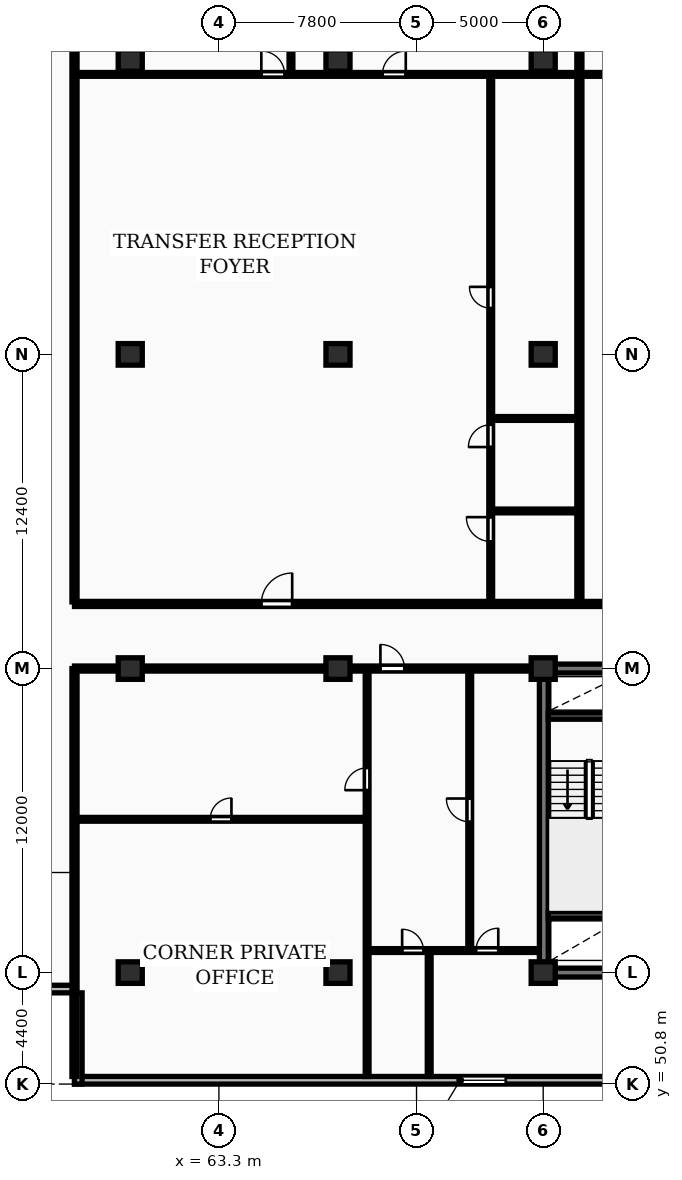
"""IFC4 building model, lengths in metres.
Left out: names, types, materials, properties, quantities, classifications, styles, units other than length and angle.
Written with IfcOpenShell. Run it as: python <this file> out.ifc"""

import sys

from ifc_helpers import new_model, si_unit, direction, frame, frame_2d, origin, origin_2d, place, context, subcontext, project, spatial, rectangle, extrude, element, fill, save


model = new_model("IFC4")
c1 = context("Model", 3, precision=1e-05, world=origin(), true_north=direction((0.0, 1.0)))
c2 = subcontext(c1, "Body", "Model", "MODEL_VIEW")
j1 = project(units=[si_unit("LENGTHUNIT", "METRE"), si_unit("PLANEANGLEUNIT", "RADIAN")], contexts=[c1])
p1 = place(None, origin())
s1 = spatial("IfcSite", under=j1, at=p1, CompositionType="ELEMENT")
p2 = place(p1, origin())
s2 = spatial("IfcBuilding", under=s1, at=p2, CompositionType="ELEMENT")
p3 = place(p2, frame((0.0, 0.0, 93.8)))
s3 = spatial("IfcBuildingStorey", under=s2, at=p3, CompositionType="ELEMENT", Elevation=93.8)
for number, where, z_axis, x_axis in (
    (1, (59.8, 55.2, 0.0), (0.0, 0.0, 1.0), (1.0, 0.0, 0.0)),
    (2, (59.8, 67.2, 0.0), (0.0, 0.0, 1.0), (1.0, 0.0, 0.0)),
    (3, (59.8, 79.6, 0.0), (0.0, 0.0, 1.0), (1.0, 0.0, 0.0)),
    (4, (59.8, 91.2, 0.0), (0.0, 0.0, 1.0), (1.0, 0.0, 0.0)),
    (5, (68.0, 55.2, 0.0), (0.0, 0.0, 1.0), (1.0, 0.0, 0.0)),
    (6, (68.0, 67.2, 0.0), (0.0, 0.0, 1.0), (1.0, 0.0, 0.0)),
    (7, (68.0, 79.6, 0.0), (0.0, 0.0, 1.0), (1.0, 0.0, 0.0)),
    (8, (68.0, 91.2, 0.0), (0.0, 0.0, 1.0), (1.0, 0.0, 0.0)),
    (9, (76.1, 55.2, 0.0), (0.0, 0.0, 1.0), (1.0, 0.0, 0.0)),
    (10, (76.1, 67.2, 0.0), (0.0, 0.0, 1.0), (1.0, 0.0, 0.0)),
    (11, (76.1, 79.6, 0.0), (0.0, 0.0, 1.0), (1.0, 0.0, 0.0)),
    (12, (76.1, 91.2, 0.0), (0.0, 0.0, 1.0), (1.0, 0.0, 0.0)),
):
    element("IfcColumn", number, at=place(p3, frame(where, z_axis=z_axis, x_axis=x_axis)), inside=s3, PredefinedType="COLUMN", context=c2, shape_type="SweptSolid", body=[
        extrude(rectangle(XDim=0.95, YDim=0.85, at=origin_2d()), origin(), (0.0, 0.0, 1.0), 3.25),
    ])
p4 = place(p3, frame((57.6, 50.95, 0.0), z_axis=(0.0, 0.0, 1.0), x_axis=(1.0, 0.0, 0.0)))
e13 = element("IfcWall", 13, at=p4, inside=s3, PredefinedType="STANDARD", context=c2, shape_type="SweptSolid", body=[
    extrude(rectangle(XDim=73.0, YDim=0.3, at=frame_2d((36.5, 0.0))), origin(), (0.0, 0.0, 1.0), 2.97),
])
p5 = place(p4, frame((15.225, 0.0, 0.85)))
e14 = element("IfcOpeningElement", 14, at=p5, cuts=e13, PredefinedType="OPENING", context=c2, shape_type="SweptSolid", body=[
    extrude(rectangle(XDim=1.8, YDim=1.8, at=frame_2d((0.9, 0.9))), frame((0.0, 0.16, 0.0), z_axis=(0.0, -1.0, 0.0), x_axis=(1.0, 0.0, 0.0)), (0.0, 0.0, 1.0), 0.32),
])
p6 = place(p4, frame((58.575, 0.0, 0.85)))
e15 = element("IfcOpeningElement", 15, at=p6, cuts=e13, PredefinedType="OPENING", context=c2, shape_type="SweptSolid", body=[
    extrude(rectangle(XDim=1.8, YDim=1.8, at=frame_2d((0.9, 0.9))), frame((0.0, 0.16, 0.0), z_axis=(0.0, -1.0, 0.0), x_axis=(1.0, 0.0, 0.0)), (0.0, 0.0, 1.0), 0.32),
])
p7 = place(p3, frame((54.0, 54.55, 0.0), z_axis=(0.0, 0.0, 1.0), x_axis=(1.0, 0.0, 0.0)))
e16 = element("IfcWall", 16, at=p7, inside=s3, PredefinedType="STANDARD", context=c2, shape_type="SweptSolid", body=[
    extrude(rectangle(XDim=3.6, YDim=0.3, at=frame_2d((1.8, 0.0))), origin(), (0.0, 0.0, 1.0), 2.97),
])
p8 = place(p3, frame((57.75, 54.4, 0.0), z_axis=(0.0, 0.0, 1.0), x_axis=(0.0, -1.0, 0.0)))
e17 = element("IfcWall", 17, at=p8, inside=s3, PredefinedType="STANDARD", context=c2, shape_type="SweptSolid", body=[
    extrude(rectangle(XDim=3.6, YDim=0.3, at=frame_2d((1.8, 0.0))), origin(), (0.0, 0.0, 1.0), 2.97),
])
p9 = place(p3, frame((75.95, 55.2, 0.0), z_axis=(0.0, 0.0, 1.0), x_axis=(1.0, 0.0, 0.0)))
e18 = element("IfcWall", 18, at=p9, inside=s3, PredefinedType="SHEAR", context=c2, shape_type="SweptSolid", body=[
    extrude(rectangle(XDim=36.3, YDim=0.35, at=frame_2d((18.15, 0.0))), origin(), (0.0, 0.0, 1.0), 3.25),
])
p10 = place(p3, frame((76.125, 55.375, 0.0), z_axis=(0.0, 0.0, 1.0), x_axis=(0.0, 1.0, 0.0)))
e19 = element("IfcWall", 19, at=p10, inside=s3, PredefinedType="SHEAR", context=c2, shape_type="SweptSolid", body=[
    extrude(rectangle(XDim=11.65, YDim=0.35, at=frame_2d((5.825, 0.0))), origin(), (0.0, 0.0, 1.0), 3.25),
])
p11 = place(p3, frame((75.95, 67.2, 0.0), z_axis=(0.0, 0.0, 1.0), x_axis=(1.0, 0.0, 0.0)))
e20 = element("IfcWall", 20, at=p11, inside=s3, PredefinedType="SHEAR", context=c2, shape_type="SweptSolid", body=[
    extrude(rectangle(XDim=36.3, YDim=0.35, at=frame_2d((18.15, 0.0))), origin(), (0.0, 0.0, 1.0), 3.25),
])
p12 = place(p11, frame((5.25, 0.0, 0.0)))
e21 = element("IfcOpeningElement", 21, at=p12, cuts=e20, PredefinedType="OPENING", context=c2, shape_type="SweptSolid", body=[
    extrude(rectangle(XDim=1.0, YDim=2.15, at=frame_2d((0.5, 1.075))), frame((0.0, 0.185, 0.0), z_axis=(0.0, -1.0, 0.0), x_axis=(1.0, 0.0, 0.0)), (0.0, 0.0, 1.0), 0.37),
])
p13 = place(p11, frame((21.6, 0.0, 0.0)))
e22 = element("IfcOpeningElement", 22, at=p13, cuts=e20, PredefinedType="OPENING", context=c2, shape_type="SweptSolid", body=[
    extrude(rectangle(XDim=1.5, YDim=2.2, at=frame_2d((0.75, 1.1))), frame((0.0, 0.185, 0.0), z_axis=(0.0, -1.0, 0.0), x_axis=(1.0, 0.0, 0.0)), (0.0, 0.0, 1.0), 0.37),
])
p14 = place(p11, frame((30.45, 0.0, 0.0)))
e23 = element("IfcOpeningElement", 23, at=p14, cuts=e20, PredefinedType="OPENING", context=c2, shape_type="SweptSolid", body=[
    extrude(rectangle(XDim=1.0, YDim=2.15, at=frame_2d((0.5, 1.075))), frame((0.0, 0.185, 0.0), z_axis=(0.0, -1.0, 0.0), x_axis=(1.0, 0.0, 0.0)), (0.0, 0.0, 1.0), 0.37),
])
for number, where, z_axis, x_axis in (
    (24, (76.3, 57.475, 0.0), (0.0, 0.0, 1.0), (1.0, 0.0, 0.0)),
    (25, (76.3, 65.325, 0.0), (0.0, 0.0, 1.0), (1.0, 0.0, 0.0)),
):
    element("IfcWall", number, at=place(p3, frame(where, z_axis=z_axis, x_axis=x_axis)), inside=s3, PredefinedType="SHEAR", context=c2, shape_type="SweptSolid", body=[
        extrude(rectangle(XDim=3.24, YDim=0.25, at=frame_2d((1.62, 0.0))), origin(), (0.0, 0.0, 1.0), 3.25),
    ])
p15 = place(p3, frame((57.6, 51.1, 0.0), z_axis=(0.0, 0.0, 1.0), x_axis=(0.0, 1.0, 0.0)))
e26 = element("IfcWall", 26, at=p15, inside=s3, PredefinedType="PARTITIONING", context=c2, shape_type="SweptSolid", body=[
    extrude(rectangle(XDim=16.1, YDim=0.2, at=frame_2d((8.05, 0.0))), origin(), (0.0, 0.0, 1.0), 2.97),
])
p16 = place(p3, frame((57.6, 61.25, 0.0), z_axis=(0.0, 0.0, 1.0), x_axis=(1.0, 0.0, 0.0)))
e27 = element("IfcWall", 27, at=p16, inside=s3, PredefinedType="PARTITIONING", context=c2, shape_type="SweptSolid", body=[
    extrude(rectangle(XDim=11.55, YDim=0.15, at=frame_2d((5.775, 0.0))), origin(), (0.0, 0.0, 1.0), 2.97),
])
p17 = place(p16, frame((5.355, 0.0, 0.0)))
e28 = element("IfcOpeningElement", 28, at=p17, cuts=e27, PredefinedType="OPENING", context=c2, shape_type="SweptSolid", body=[
    extrude(rectangle(XDim=0.84, YDim=2.04, at=frame_2d((0.42, 1.02))), frame((0.0, 0.085, 0.0), z_axis=(0.0, -1.0, 0.0), x_axis=(1.0, 0.0, 0.0)), (0.0, 0.0, 1.0), 0.17),
])
p18 = place(p3, frame((69.15, 51.1, 0.0), z_axis=(0.0, 0.0, 1.0), x_axis=(0.0, 1.0, 0.0)))
e29 = element("IfcWall", 29, at=p18, inside=s3, PredefinedType="PARTITIONING", context=c2, shape_type="SweptSolid", body=[
    extrude(rectangle(XDim=16.05, YDim=0.15, at=frame_2d((8.025, 0.0))), origin(), (0.0, 0.0, 1.0), 2.97),
])
p19 = place(p18, frame((11.3, 0.0, 0.0)))
e30 = element("IfcOpeningElement", 30, at=p19, cuts=e29, PredefinedType="OPENING", context=c2, shape_type="SweptSolid", body=[
    extrude(rectangle(XDim=0.88, YDim=2.06, at=frame_2d((0.44, 1.03))), frame((0.0, 0.085, 0.0), z_axis=(0.0, -1.0, 0.0), x_axis=(1.0, 0.0, 0.0)), (0.0, 0.0, 1.0), 0.17),
])
p20 = place(p3, frame((73.2, 56.07, 0.0), z_axis=(0.0, 0.0, 1.0), x_axis=(0.0, 1.0, 0.0)))
e31 = element("IfcWall", 31, at=p20, inside=s3, PredefinedType="PARTITIONING", context=c2, shape_type="SweptSolid", body=[
    extrude(rectangle(XDim=11.08, YDim=0.15, at=frame_2d((5.54, 0.0))), origin(), (0.0, 0.0, 1.0), 2.97),
])
p21 = place(p20, frame((5.08, 0.0, 0.0)))
e32 = element("IfcOpeningElement", 32, at=p21, cuts=e31, PredefinedType="OPENING", context=c2, shape_type="SweptSolid", body=[
    extrude(rectangle(XDim=0.92, YDim=2.08, at=frame_2d((0.46, 1.04))), frame((0.0, 0.085, 0.0), z_axis=(0.0, -1.0, 0.0), x_axis=(1.0, 0.0, 0.0)), (0.0, 0.0, 1.0), 0.17),
])
p22 = place(p3, frame((71.6, 51.1, 0.0), z_axis=(0.0, 0.0, 1.0), x_axis=(0.0, 1.0, 0.0)))
e33 = element("IfcWall", 33, at=p22, inside=s3, PredefinedType="PARTITIONING", context=c2, shape_type="SweptSolid", body=[
    extrude(rectangle(XDim=4.97, YDim=0.15, at=frame_2d((2.485, 0.0))), origin(), (0.0, 0.0, 1.0), 2.97),
])
p23 = place(p3, frame((69.17, 56.07, 0.0), z_axis=(0.0, 0.0, 1.0), x_axis=(1.0, 0.0, 0.0)))
e34 = element("IfcWall", 34, at=p23, inside=s3, PredefinedType="PARTITIONING", context=c2, shape_type="SweptSolid", body=[
    extrude(rectangle(XDim=6.76, YDim=0.15, at=frame_2d((3.38, 0.0))), origin(), (0.0, 0.0, 1.0), 2.97),
])
p24 = place(p23, frame((1.362, 0.0, 0.0)))
e35 = element("IfcOpeningElement", 35, at=p24, cuts=e34, PredefinedType="OPENING", context=c2, shape_type="SweptSolid", body=[
    extrude(rectangle(XDim=0.84, YDim=2.04, at=frame_2d((0.42, 1.02))), frame((0.0, 0.085, 0.0), z_axis=(0.0, -1.0, 0.0), x_axis=(1.0, 0.0, 0.0)), (0.0, 0.0, 1.0), 0.17),
])
p25 = place(p23, frame((4.277, 0.0, 0.0)))
e36 = element("IfcOpeningElement", 36, at=p25, cuts=e34, PredefinedType="OPENING", context=c2, shape_type="SweptSolid", body=[
    extrude(rectangle(XDim=0.88, YDim=2.06, at=frame_2d((0.44, 1.03))), frame((0.0, 0.085, 0.0), z_axis=(0.0, -1.0, 0.0), x_axis=(1.0, 0.0, 0.0)), (0.0, 0.0, 1.0), 0.17),
])
p26 = place(p3, frame((57.6, 67.2, 0.0), z_axis=(0.0, 0.0, 1.0), x_axis=(1.0, 0.0, 0.0)))
e37 = element("IfcWall", 37, at=p26, inside=s3, PredefinedType="PARTITIONING", context=c2, shape_type="SweptSolid", body=[
    extrude(rectangle(XDim=18.35, YDim=0.2, at=frame_2d((9.175, 0.0))), origin(), (0.0, 0.0, 1.0), 2.433),
])
p27 = place(p26, frame((12.075, 0.0, 0.0)))
e38 = element("IfcOpeningElement", 38, at=p27, cuts=e37, PredefinedType="OPENING", context=c2, shape_type="SweptSolid", body=[
    extrude(rectangle(XDim=0.95, YDim=2.15, at=frame_2d((0.475, 1.075))), frame((0.0, 0.11, 0.0), z_axis=(0.0, -1.0, 0.0), x_axis=(1.0, 0.0, 0.0)), (0.0, 0.0, 1.0), 0.22),
])
for number, where, z_axis, x_axis in (
    (39, (57.6, 69.83, 0.0), (0.0, 0.0, 1.0), (0.0, 1.0, 0.0)),
    (40, (77.528, 69.83, 0.0), (0.0, 0.0, 1.0), (0.0, 1.0, 0.0)),
):
    element("IfcWall", number, at=place(p3, frame(where, z_axis=z_axis, x_axis=x_axis)), inside=s3, PredefinedType="PARTITIONING", context=c2, shape_type="SweptSolid", body=[
        extrude(rectangle(XDim=26.07, YDim=0.2, at=frame_2d((13.035, 0.0))), origin(), (0.0, 0.0, 1.0), 2.97),
    ])
p28 = place(p3, frame((74.088, 73.42, 0.0), z_axis=(0.0, 0.0, 1.0), x_axis=(1.0, 0.0, 0.0)))
e41 = element("IfcWall", 41, at=p28, inside=s3, PredefinedType="PARTITIONING", context=c2, shape_type="SweptSolid", body=[
    extrude(rectangle(XDim=3.36, YDim=0.15, at=frame_2d((1.68, 0.0))), origin(), (0.0, 0.0, 1.0), 2.561),
])
p29 = place(p3, frame((74.088, 77.07, 0.0), z_axis=(0.0, 0.0, 1.0), x_axis=(1.0, 0.0, 0.0)))
e42 = element("IfcWall", 42, at=p29, inside=s3, PredefinedType="PARTITIONING", context=c2, shape_type="SweptSolid", body=[
    extrude(rectangle(XDim=3.36, YDim=0.15, at=frame_2d((1.68, 0.0))), origin(), (0.0, 0.0, 1.0), 2.97),
])
p30 = place(p3, frame((74.028, 69.81, 0.0), z_axis=(0.0, 0.0, 1.0), x_axis=(0.0, 1.0, 0.0)))
e43 = element("IfcWall", 43, at=p30, inside=s3, PredefinedType="PARTITIONING", context=c2, shape_type="SweptSolid", body=[
    extrude(rectangle(XDim=20.78, YDim=0.15, at=frame_2d((10.39, 0.0))), origin(), (0.0, 0.0, 1.0), 2.97),
])
p31 = place(p30, frame((2.406, 0.0, 0.0)))
e44 = element("IfcOpeningElement", 44, at=p31, cuts=e43, PredefinedType="OPENING", context=c2, shape_type="SweptSolid", body=[
    extrude(rectangle(XDim=0.96, YDim=2.1, at=frame_2d((0.48, 1.05))), frame((0.0, 0.085, 0.0), z_axis=(0.0, -1.0, 0.0), x_axis=(1.0, 0.0, 0.0)), (0.0, 0.0, 1.0), 0.17),
])
p32 = place(p30, frame((6.133, 0.0, 0.0)))
e45 = element("IfcOpeningElement", 45, at=p32, cuts=e43, PredefinedType="OPENING", context=c2, shape_type="SweptSolid", body=[
    extrude(rectangle(XDim=0.88, YDim=2.06, at=frame_2d((0.44, 1.03))), frame((0.0, 0.085, 0.0), z_axis=(0.0, -1.0, 0.0), x_axis=(1.0, 0.0, 0.0)), (0.0, 0.0, 1.0), 0.17),
])
p33 = place(p30, frame((11.615, 0.0, 0.0)))
e46 = element("IfcOpeningElement", 46, at=p33, cuts=e43, PredefinedType="OPENING", context=c2, shape_type="SweptSolid", body=[
    extrude(rectangle(XDim=0.84, YDim=2.04, at=frame_2d((0.42, 1.02))), frame((0.0, 0.085, 0.0), z_axis=(0.0, -1.0, 0.0), x_axis=(1.0, 0.0, 0.0)), (0.0, 0.0, 1.0), 0.17),
])
p34 = place(p3, frame((66.144, 90.73, 0.0), z_axis=(0.0, 0.0, 1.0), x_axis=(0.0, 1.0, 0.0)))
e47 = element("IfcWall", 47, at=p34, inside=s3, PredefinedType="PARTITIONING", context=c2, shape_type="SweptSolid", body=[
    extrude(rectangle(XDim=5.17, YDim=0.15, at=frame_2d((2.585, 0.0))), origin(), (0.0, 0.0, 1.0), 2.97),
])
p35 = place(p3, frame((57.68, 90.65, 0.0), z_axis=(0.0, 0.0, 1.0), x_axis=(1.0, 0.0, 0.0)))
e48 = element("IfcWall", 48, at=p35, inside=s3, PredefinedType="PARTITIONING", context=c2, shape_type="SweptSolid", body=[
    extrude(rectangle(XDim=19.769, YDim=0.15, at=frame_2d((9.884, 0.0))), origin(), (0.0, 0.0, 1.0), 2.97),
])
p36 = place(p35, frame((7.294, 0.0, 0.0)))
e49 = element("IfcOpeningElement", 49, at=p36, cuts=e48, PredefinedType="OPENING", context=c2, shape_type="SweptSolid", body=[
    extrude(rectangle(XDim=0.92, YDim=2.08, at=frame_2d((0.46, 1.04))), frame((0.0, 0.085, 0.0), z_axis=(0.0, -1.0, 0.0), x_axis=(1.0, 0.0, 0.0)), (0.0, 0.0, 1.0), 0.17),
])
p37 = place(p35, frame((12.076, 0.0, 0.0)))
e50 = element("IfcOpeningElement", 50, at=p37, cuts=e48, PredefinedType="OPENING", context=c2, shape_type="SweptSolid", body=[
    extrude(rectangle(XDim=0.92, YDim=2.08, at=frame_2d((0.46, 1.04))), frame((0.0, 0.085, 0.0), z_axis=(0.0, -1.0, 0.0), x_axis=(1.0, 0.0, 0.0)), (0.0, 0.0, 1.0), 0.17),
])
p38 = place(p3, frame((77.608, 90.65, 0.0), z_axis=(0.0, 0.0, 1.0), x_axis=(1.0, 0.0, 0.0)))
e51 = element("IfcWall", 51, at=p38, inside=s3, PredefinedType="PARTITIONING", context=c2, shape_type="SweptSolid", body=[
    extrude(rectangle(XDim=21.87, YDim=0.15, at=frame_2d((10.935, 0.0))), origin(), (0.0, 0.0, 1.0), 2.97),
])
p39 = place(p38, frame((4.191, 0.0, 0.0)))
e52 = element("IfcOpeningElement", 52, at=p39, cuts=e51, PredefinedType="OPENING", context=c2, shape_type="SweptSolid", body=[
    extrude(rectangle(XDim=0.92, YDim=2.08, at=frame_2d((0.46, 1.04))), frame((0.0, 0.085, 0.0), z_axis=(0.0, -1.0, 0.0), x_axis=(1.0, 0.0, 0.0)), (0.0, 0.0, 1.0), 0.17),
])
p40 = place(p38, frame((10.475, 0.0, 0.0)))
e53 = element("IfcOpeningElement", 53, at=p40, cuts=e51, PredefinedType="OPENING", context=c2, shape_type="SweptSolid", body=[
    extrude(rectangle(XDim=0.92, YDim=2.08, at=frame_2d((0.46, 1.04))), frame((0.0, 0.085, 0.0), z_axis=(0.0, -1.0, 0.0), x_axis=(1.0, 0.0, 0.0)), (0.0, 0.0, 1.0), 0.17),
])
p41 = place(p3, frame((57.6, 69.75, 0.0), z_axis=(0.0, 0.0, 1.0), x_axis=(1.0, 0.0, 0.0)))
e54 = element("IfcWall", 54, at=p41, inside=s3, PredefinedType="PARTITIONING", context=c2, shape_type="SweptSolid", body=[
    extrude(rectangle(XDim=73.0, YDim=0.2, at=frame_2d((36.5, 0.0))), origin(), (0.0, 0.0, 1.0), 2.97),
])
p42 = place(p41, frame((7.372, 0.0, 0.0)))
e55 = element("IfcOpeningElement", 55, at=p42, cuts=e54, PredefinedType="OPENING", context=c2, shape_type="SweptSolid", body=[
    extrude(rectangle(XDim=1.22, YDim=2.18, at=frame_2d((0.61, 1.09))), frame((0.0, 0.11, 0.0), z_axis=(0.0, -1.0, 0.0), x_axis=(1.0, 0.0, 0.0)), (0.0, 0.0, 1.0), 0.22),
])
p43 = place(p41, frame((29.368, 0.0, 0.0)))
e56 = element("IfcOpeningElement", 56, at=p43, cuts=e54, PredefinedType="OPENING", context=c2, shape_type="SweptSolid", body=[
    extrude(rectangle(XDim=1.22, YDim=2.18, at=frame_2d((0.61, 1.09))), frame((0.0, 0.11, 0.0), z_axis=(0.0, -1.0, 0.0), x_axis=(1.0, 0.0, 0.0)), (0.0, 0.0, 1.0), 0.22),
])
p44 = place(p41, frame((48.88, 0.0, 0.0)))
e57 = element("IfcOpeningElement", 57, at=p44, cuts=e54, PredefinedType="OPENING", context=c2, shape_type="SweptSolid", body=[
    extrude(rectangle(XDim=1.22, YDim=2.18, at=frame_2d((0.61, 1.09))), frame((0.0, 0.11, 0.0), z_axis=(0.0, -1.0, 0.0), x_axis=(1.0, 0.0, 0.0)), (0.0, 0.0, 1.0), 0.22),
])
p45 = place(p41, frame((60.081, 0.0, 0.0)))
e58 = element("IfcOpeningElement", 58, at=p45, cuts=e54, PredefinedType="OPENING", context=c2, shape_type="SweptSolid", body=[
    extrude(rectangle(XDim=0.95, YDim=2.15, at=frame_2d((0.475, 1.075))), frame((0.0, 0.11, 0.0), z_axis=(0.0, -1.0, 0.0), x_axis=(1.0, 0.0, 0.0)), (0.0, 0.0, 1.0), 0.22),
])
p46 = place(p5, origin())
e59 = element("IfcWindow", 59, at=p46, inside=s3, PartitioningType="SINGLE_PANEL", PredefinedType="WINDOW", context=c2, shape_type="SweptSolid", body=[
    extrude(rectangle(XDim=1.8, YDim=1.8, at=frame_2d((0.9, 0.9))), frame((0.0, 0.03, 0.0), z_axis=(0.0, -1.0, 0.0), x_axis=(1.0, 0.0, 0.0)), (0.0, 0.0, 1.0), 0.06),
])
fill(e14, e59)
p47 = place(p17, origin())
e60 = element("IfcDoor", 60, at=p47, inside=s3, OperationType="SINGLE_SWING_RIGHT", PredefinedType="DOOR", context=c2, shape_type="SweptSolid", body=[
    extrude(rectangle(XDim=0.84, YDim=2.04, at=frame_2d((0.42, 1.02))), frame((0.0, 0.025, 0.0), z_axis=(0.0, -1.0, 0.0), x_axis=(1.0, 0.0, 0.0)), (0.0, 0.0, 1.0), 0.05),
])
fill(e28, e60)
p48 = place(p19, origin())
e61 = element("IfcDoor", 61, at=p48, inside=s3, OperationType="SINGLE_SWING_LEFT", PredefinedType="DOOR", context=c2, shape_type="SweptSolid", body=[
    extrude(rectangle(XDim=0.88, YDim=2.06, at=frame_2d((0.44, 1.03))), frame((0.0, 0.025, 0.0), z_axis=(0.0, -1.0, 0.0), x_axis=(1.0, 0.0, 0.0)), (0.0, 0.0, 1.0), 0.05),
])
fill(e30, e61)
p49 = place(p21, origin())
e62 = element("IfcDoor", 62, at=p49, inside=s3, OperationType="SINGLE_SWING_RIGHT", PredefinedType="DOOR", context=c2, shape_type="SweptSolid", body=[
    extrude(rectangle(XDim=0.92, YDim=2.08, at=frame_2d((0.46, 1.04))), frame((0.0, 0.025, 0.0), z_axis=(0.0, -1.0, 0.0), x_axis=(1.0, 0.0, 0.0)), (0.0, 0.0, 1.0), 0.05),
])
fill(e32, e62)
p50 = place(p24, origin())
e63 = element("IfcDoor", 63, at=p50, inside=s3, OperationType="SINGLE_SWING_LEFT", PredefinedType="DOOR", context=c2, shape_type="SweptSolid", body=[
    extrude(rectangle(XDim=0.84, YDim=2.04, at=frame_2d((0.42, 1.02))), frame((0.0, 0.025, 0.0), z_axis=(0.0, -1.0, 0.0), x_axis=(1.0, 0.0, 0.0)), (0.0, 0.0, 1.0), 0.05),
])
fill(e35, e63)
p51 = place(p25, origin())
e64 = element("IfcDoor", 64, at=p51, inside=s3, OperationType="SINGLE_SWING_RIGHT", PredefinedType="DOOR", context=c2, shape_type="SweptSolid", body=[
    extrude(rectangle(XDim=0.88, YDim=2.06, at=frame_2d((0.44, 1.03))), frame((0.0, 0.025, 0.0), z_axis=(0.0, -1.0, 0.0), x_axis=(1.0, 0.0, 0.0)), (0.0, 0.0, 1.0), 0.05),
])
fill(e36, e64)
p52 = place(p27, origin())
e65 = element("IfcDoor", 65, at=p52, inside=s3, OperationType="SINGLE_SWING_LEFT", PredefinedType="DOOR", context=c2, shape_type="SweptSolid", body=[
    extrude(rectangle(XDim=0.95, YDim=2.15, at=frame_2d((0.475, 1.075))), frame((0.0, 0.025, 0.0), z_axis=(0.0, -1.0, 0.0), x_axis=(1.0, 0.0, 0.0)), (0.0, 0.0, 1.0), 0.05),
])
fill(e38, e65)
p53 = place(p31, origin())
e66 = element("IfcDoor", 66, at=p53, inside=s3, OperationType="SINGLE_SWING_RIGHT", PredefinedType="DOOR", context=c2, shape_type="SweptSolid", body=[
    extrude(rectangle(XDim=0.96, YDim=2.1, at=frame_2d((0.48, 1.05))), frame((0.0, 0.025, 0.0), z_axis=(0.0, -1.0, 0.0), x_axis=(1.0, 0.0, 0.0)), (0.0, 0.0, 1.0), 0.05),
])
fill(e44, e66)
p54 = place(p32, origin())
e67 = element("IfcDoor", 67, at=p54, inside=s3, OperationType="SINGLE_SWING_LEFT", PredefinedType="DOOR", context=c2, shape_type="SweptSolid", body=[
    extrude(rectangle(XDim=0.88, YDim=2.06, at=frame_2d((0.44, 1.03))), frame((0.0, 0.025, 0.0), z_axis=(0.0, -1.0, 0.0), x_axis=(1.0, 0.0, 0.0)), (0.0, 0.0, 1.0), 0.05),
])
fill(e45, e67)
p55 = place(p33, origin())
e68 = element("IfcDoor", 68, at=p55, inside=s3, OperationType="SINGLE_SWING_RIGHT", PredefinedType="DOOR", context=c2, shape_type="SweptSolid", body=[
    extrude(rectangle(XDim=0.84, YDim=2.04, at=frame_2d((0.42, 1.02))), frame((0.0, 0.025, 0.0), z_axis=(0.0, -1.0, 0.0), x_axis=(1.0, 0.0, 0.0)), (0.0, 0.0, 1.0), 0.05),
])
fill(e46, e68)
p56 = place(p36, origin())
e69 = element("IfcDoor", 69, at=p56, inside=s3, OperationType="SINGLE_SWING_LEFT", PredefinedType="DOOR", context=c2, shape_type="SweptSolid", body=[
    extrude(rectangle(XDim=0.92, YDim=2.08, at=frame_2d((0.46, 1.04))), frame((0.0, 0.025, 0.0), z_axis=(0.0, -1.0, 0.0), x_axis=(1.0, 0.0, 0.0)), (0.0, 0.0, 1.0), 0.05),
])
fill(e49, e69)
p57 = place(p37, origin())
e70 = element("IfcDoor", 70, at=p57, inside=s3, OperationType="SINGLE_SWING_RIGHT", PredefinedType="DOOR", context=c2, shape_type="SweptSolid", body=[
    extrude(rectangle(XDim=0.92, YDim=2.08, at=frame_2d((0.46, 1.04))), frame((0.0, 0.025, 0.0), z_axis=(0.0, -1.0, 0.0), x_axis=(1.0, 0.0, 0.0)), (0.0, 0.0, 1.0), 0.05),
])
fill(e50, e70)
p58 = place(p42, origin())
e71 = element("IfcDoor", 71, at=p58, inside=s3, OperationType="SINGLE_SWING_RIGHT", PredefinedType="DOOR", context=c2, shape_type="SweptSolid", body=[
    extrude(rectangle(XDim=1.22, YDim=2.18, at=frame_2d((0.61, 1.09))), frame((0.0, 0.025, 0.0), z_axis=(0.0, -1.0, 0.0), x_axis=(1.0, 0.0, 0.0)), (0.0, 0.0, 1.0), 0.05),
])
fill(e55, e71)
save(model, sys.argv[1])
